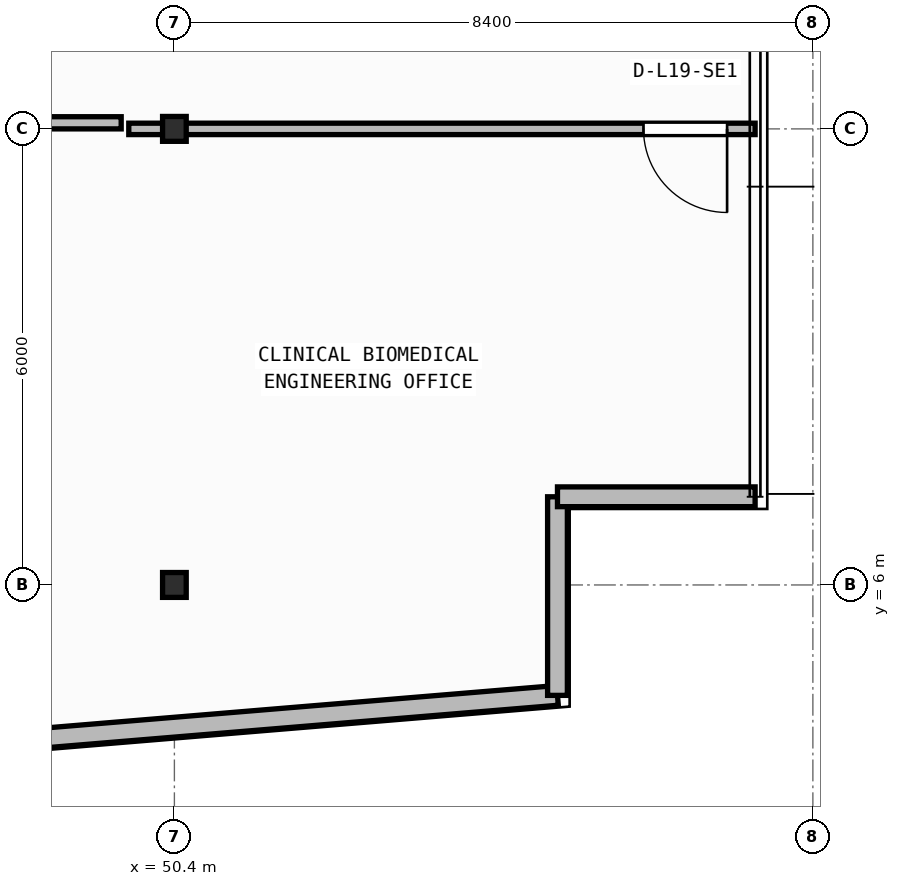
"""IFC4 building model, lengths in metres.
Left out: names, types, materials, properties, quantities, classifications, styles, units other than length and angle.
Written with IfcOpenShell. Run it as: python <this file> out.ifc"""

import sys

from ifc_helpers import new_model, si_unit, direction, frame, frame_2d, origin, origin_2d, place, context, subcontext, project, spatial, rectangle, i_section, extrude, element, fill, save


model = new_model("IFC4")
c1 = context("Model", 3, precision=1e-05, world=origin(), true_north=direction((0.0, 1.0)))
c2 = subcontext(c1, "Body", "Model", "MODEL_VIEW")
j1 = project(units=[si_unit("LENGTHUNIT", "METRE"), si_unit("PLANEANGLEUNIT", "RADIAN")], contexts=[c1])
p1 = place(None, origin())
s1 = spatial("IfcSite", under=j1, at=p1, CompositionType="ELEMENT")
p2 = place(p1, origin())
s2 = spatial("IfcBuilding", under=s1, at=p2, CompositionType="ELEMENT")
p3 = place(p2, frame((0.0, 0.0, 77.8)))
s3 = spatial("IfcBuildingStorey", under=s2, at=p3, CompositionType="ELEMENT", Elevation=77.8)
for number, where, z_axis, x_axis in (
    (1, (50.4, 6.0, 0.0), (0.0, 0.0, 1.0), (1.0, 0.0, 0.0)),
    (2, (50.4, 12.0, 0.0), (0.0, 0.0, 1.0), (1.0, 0.0, 0.0)),
):
    element("IfcColumn", number, at=place(p3, frame(where, z_axis=z_axis, x_axis=x_axis)), inside=s3, PredefinedType="COLUMN", context=c2, shape_type="SweptSolid", body=[
        extrude(i_section(OverallWidth=0.311, OverallDepth=0.327, WebThickness=0.016, FlangeThickness=0.025, FilletRadius=0.017, at=origin_2d()), origin(), (0.0, 0.0, 1.0), 3.95),
    ])
p4 = place(p3, frame((2.76, 0.174, 0.0), z_axis=(0.0, 0.0, 1.0), x_axis=(0.996571478456, 0.082736257641, 0.0)))
e3 = element("IfcWall", 3, at=p4, inside=s3, PredefinedType="STANDARD", context=c2, shape_type="SweptSolid", body=[
    extrude(rectangle(XDim=52.861, YDim=0.26, at=frame_2d((26.431, 0.0))), origin(), (0.0, 0.0, 1.0), 3.71),
])
p5 = place(p4, frame((25.231, 0.0, 0.9)))
e4 = element("IfcOpeningElement", 4, at=p5, cuts=e3, PredefinedType="OPENING", context=c2, shape_type="SweptSolid", body=[
    extrude(rectangle(XDim=2.4, YDim=1.65, at=frame_2d((1.2, 0.825))), frame((0.0, 0.14, 0.0), z_axis=(0.0, -1.0, 0.0), x_axis=(1.0, 0.0, 0.0)), (0.0, 0.0, 1.0), 0.28),
])
p6 = place(p3, frame((55.44, 4.547, 0.0), z_axis=(0.0, 0.0, 1.0), x_axis=(0.0, 1.0, 0.0)))
e5 = element("IfcWall", 5, at=p6, inside=s3, PredefinedType="STANDARD", context=c2, shape_type="SweptSolid", body=[
    extrude(rectangle(XDim=2.613, YDim=0.26, at=frame_2d((1.306, 0.0))), origin(), (0.0, 0.0, 1.0), 3.71),
])
p7 = place(p3, frame((55.44, 7.16, 0.0), z_axis=(0.0, 0.0, 1.0), x_axis=(1.0, 0.0, 0.0)))
e6 = element("IfcWall", 6, at=p7, inside=s3, PredefinedType="STANDARD", context=c2, shape_type="SweptSolid", body=[
    extrude(rectangle(XDim=2.6, YDim=0.26, at=frame_2d((1.3, 0.0))), origin(), (0.0, 0.0, 1.0), 3.71),
])
p8 = place(p3, frame((58.04, 12.0, 0.0), z_axis=(0.0, 0.0, 1.0), x_axis=(-1.0, 0.0, 0.0)))
e7 = element("IfcWall", 7, at=p8, inside=s3, PredefinedType="PARTITIONING", context=c2, shape_type="SweptSolid", body=[
    extrude(rectangle(XDim=8.24, YDim=0.15, at=frame_2d((4.12, 0.0))), origin(), (0.0, 0.0, 1.0), 3.073),
])
p9 = place(p8, frame((0.368, 0.0, 0.0)))
e8 = element("IfcOpeningElement", 8, at=p9, cuts=e7, PredefinedType="OPENING", context=c2, shape_type="SweptSolid", body=[
    extrude(rectangle(XDim=1.1, YDim=2.1, at=frame_2d((0.55, 1.05))), frame((0.0, 0.085, 0.0), z_axis=(0.0, -1.0, 0.0), x_axis=(1.0, 0.0, 0.0)), (0.0, 0.0, 1.0), 0.17),
])
p10 = place(p3, frame((46.689, 12.08, 0.0), z_axis=(0.0, 0.0, 1.0), x_axis=(1.0, 0.0, 0.0)))
e9 = element("IfcWall", 9, at=p10, inside=s3, PredefinedType="PARTITIONING", context=c2, shape_type="SweptSolid", body=[
    extrude(rectangle(XDim=3.011, YDim=0.16, at=frame_2d((1.505, 0.0))), origin(), (0.0, 0.0, 1.0), 3.073),
])
p11 = place(p9, origin())
e10 = element("IfcDoor", 10, at=p11, inside=s3, OperationType="SINGLE_SWING_LEFT", PredefinedType="DOOR", context=c2, shape_type="SweptSolid", body=[
    extrude(rectangle(XDim=1.1, YDim=2.1, at=frame_2d((0.55, 1.05))), frame((0.0, 0.025, 0.0), z_axis=(0.0, -1.0, 0.0), x_axis=(1.0, 0.0, 0.0)), (0.0, 0.0, 1.0), 0.05),
])
fill(e8, e10)
save(model, sys.argv[1])
